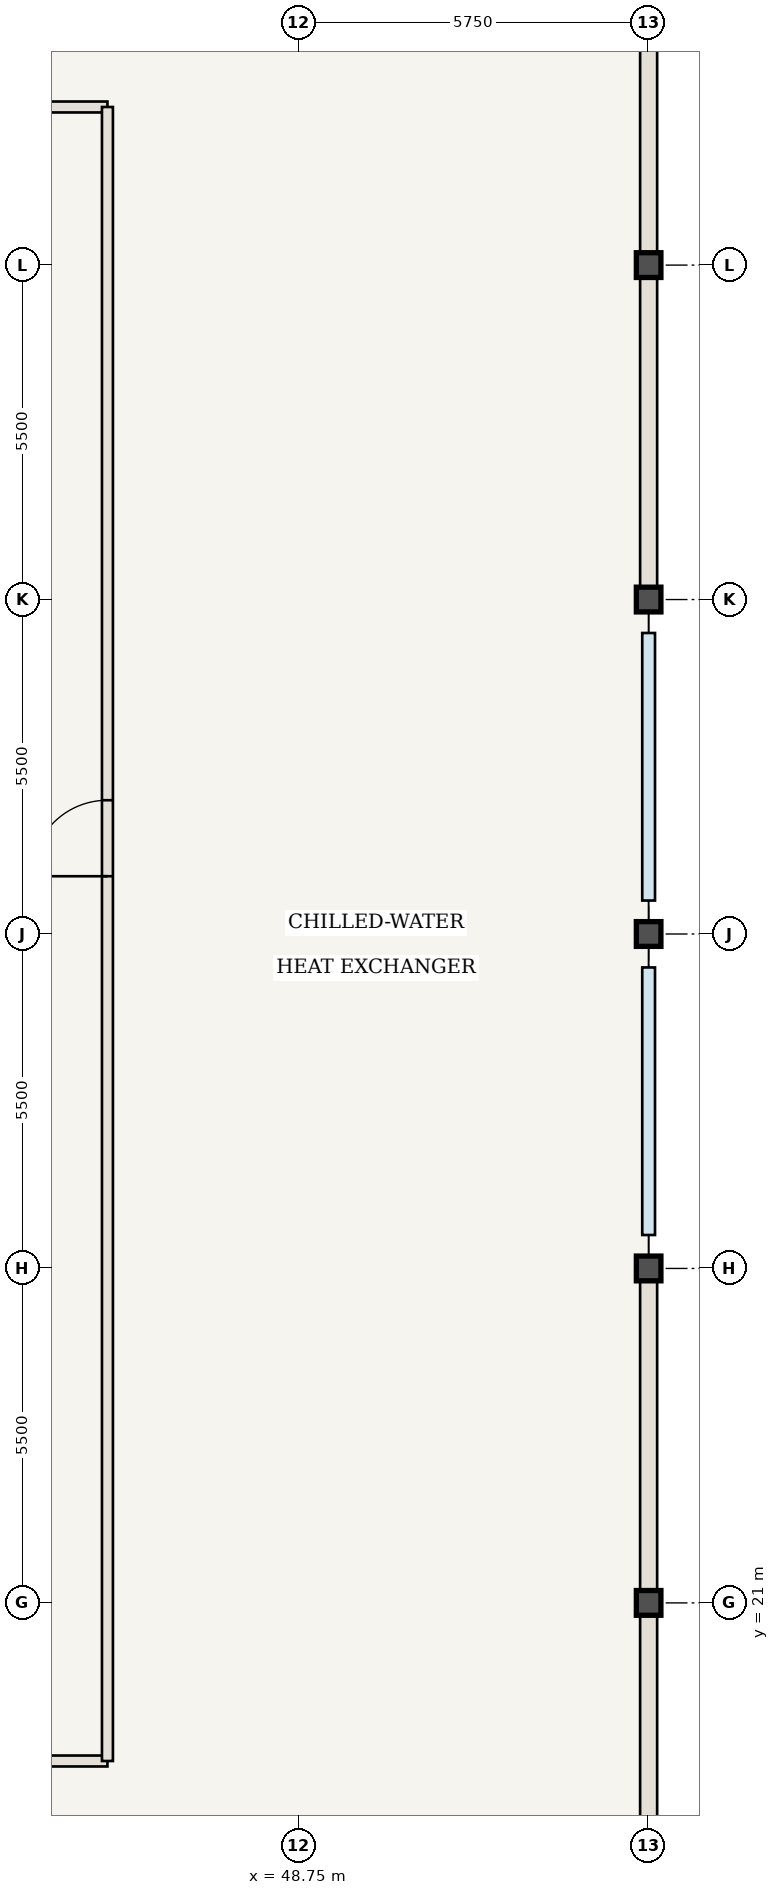
"""IFC4 building model, lengths in metres.
Left out: names, types, materials, properties, quantities, classifications, styles, units other than length and angle.
Written with IfcOpenShell. Run it as: python <this file> out.ifc"""

import sys

from ifc_helpers import new_model, si_unit, direction, frame, frame_2d, origin, origin_2d, place, context, subcontext, project, spatial, rectangle, i_section, extrude, element, fill, save


model = new_model("IFC4")
c1 = context("Model", 3, precision=1e-05, world=origin(), true_north=direction((0.0, 1.0)))
c2 = subcontext(c1, "Body", "Model", "MODEL_VIEW")
j1 = project(units=[si_unit("LENGTHUNIT", "METRE"), si_unit("PLANEANGLEUNIT", "RADIAN")], contexts=[c1])
p1 = place(None, origin())
s1 = spatial("IfcSite", under=j1, at=p1, CompositionType="ELEMENT")
p2 = place(p1, origin())
s2 = spatial("IfcBuilding", under=s1, at=p2, CompositionType="ELEMENT")
p3 = place(p2, frame((0.0, 0.0, 322.35)))
s3 = spatial("IfcBuildingStorey", under=s2, at=p3, CompositionType="ELEMENT", Elevation=322.35)
for number, where, z_axis, x_axis in (
    (1, (54.5, 21.0, 0.0), (0.0, 0.0, 1.0), (1.0, 0.0, 0.0)),
    (2, (54.5, 26.5, 0.0), (0.0, 0.0, 1.0), (1.0, 0.0, 0.0)),
    (3, (54.5, 32.0, 0.0), (0.0, 0.0, 1.0), (1.0, 0.0, 0.0)),
    (4, (54.5, 37.5, 0.0), (0.0, 0.0, 1.0), (1.0, 0.0, 0.0)),
    (5, (54.5, 43.0, 0.0), (0.0, 0.0, 1.0), (1.0, 0.0, 0.0)),
):
    element("IfcColumn", number, at=place(p3, frame(where, z_axis=z_axis, x_axis=x_axis)), inside=s3, PredefinedType="COLUMN", context=c2, shape_type="SweptSolid", body=[
        extrude(i_section(OverallWidth=0.404, OverallDepth=0.407, WebThickness=0.027, FlangeThickness=0.044, at=origin_2d()), origin(), (0.0, 0.0, 1.0), 4.55),
    ])
p4 = place(p3, frame((18.4, 18.4, 0.0), z_axis=(0.0, 0.0, 1.0), x_axis=(1.0, 0.0, 0.0)))
e6 = element("IfcWall", 6, at=p4, inside=s3, PredefinedType="STANDARD", context=c2, shape_type="SweptSolid", body=[
    extrude(rectangle(XDim=27.2, YDim=0.18, at=frame_2d((13.6, 0.0))), origin(), (0.0, 0.0, 1.0), 4.29),
])
p5 = place(p4, frame((4.4, 0.0, 0.0)))
e7 = element("IfcOpeningElement", 7, at=p5, cuts=e6, PredefinedType="OPENING", context=c2, shape_type="SweptSolid", body=[
    extrude(rectangle(XDim=1.25, YDim=2.2, at=frame_2d((0.625, 1.1))), frame((0.0, 0.1, 0.0), z_axis=(0.0, -1.0, 0.0), x_axis=(1.0, 0.0, 0.0)), (0.0, 0.0, 1.0), 0.2),
])
p6 = place(p3, frame((18.4, 45.6, 0.0), z_axis=(0.0, 0.0, 1.0), x_axis=(1.0, 0.0, 0.0)))
e8 = element("IfcWall", 8, at=p6, inside=s3, PredefinedType="STANDARD", context=c2, shape_type="SweptSolid", body=[
    extrude(rectangle(XDim=27.2, YDim=0.18, at=frame_2d((13.6, 0.0))), origin(), (0.0, 0.0, 1.0), 4.29),
])
p7 = place(p6, frame((4.4, 0.0, 0.0)))
e9 = element("IfcOpeningElement", 9, at=p7, cuts=e8, PredefinedType="OPENING", context=c2, shape_type="SweptSolid", body=[
    extrude(rectangle(XDim=1.25, YDim=2.2, at=frame_2d((0.625, 1.1))), frame((0.0, 0.1, 0.0), z_axis=(0.0, -1.0, 0.0), x_axis=(1.0, 0.0, 0.0)), (0.0, 0.0, 1.0), 0.2),
])
p8 = place(p3, frame((45.6, 18.4, 0.0), z_axis=(0.0, 0.0, 1.0), x_axis=(0.0, 1.0, 0.0)))
e10 = element("IfcWall", 10, at=p8, inside=s3, PredefinedType="STANDARD", context=c2, shape_type="SweptSolid", body=[
    extrude(rectangle(XDim=27.2, YDim=0.18, at=frame_2d((13.6, 0.0))), origin(), (0.0, 0.0, 1.0), 4.29),
])
p9 = place(p8, frame((14.55, 0.0, 0.0)))
e11 = element("IfcOpeningElement", 11, at=p9, cuts=e10, PredefinedType="OPENING", context=c2, shape_type="SweptSolid", body=[
    extrude(rectangle(XDim=1.25, YDim=2.2, at=frame_2d((0.625, 1.1))), frame((0.0, 0.1, 0.0), z_axis=(0.0, -1.0, 0.0), x_axis=(1.0, 0.0, 0.0)), (0.0, 0.0, 1.0), 0.2),
])
for number, where, z_axis, x_axis in (
    (12, (54.5, 21.0, 0.0), (0.0, 0.0, 1.0), (0.0, -1.0, 0.0)),
    (13, (54.5, 26.5, 0.0), (0.0, 0.0, 1.0), (0.0, -1.0, 0.0)),
    (14, (54.5, 43.0, 0.0), (0.0, 0.0, 1.0), (0.0, -1.0, 0.0)),
    (15, (54.5, 48.5, 0.0), (0.0, 0.0, 1.0), (0.0, -1.0, 0.0)),
):
    element("IfcWall", number, at=place(p3, frame(where, z_axis=z_axis, x_axis=x_axis)), inside=s3, PredefinedType="USERDEFINED", context=c2, shape_type="SweptSolid", body=[
        extrude(rectangle(XDim=5.5, YDim=0.28, at=frame_2d((2.75, 0.0))), origin(), (0.0, 0.0, 1.0), 3.57),
    ])
p10 = place(p9, origin())
e16 = element("IfcDoor", 16, at=p10, inside=s3, OperationType="SINGLE_SWING_LEFT", PredefinedType="DOOR", context=c2, shape_type="SweptSolid", body=[
    extrude(rectangle(XDim=1.25, YDim=2.2, at=frame_2d((0.625, 1.1))), frame((0.0, 0.025, 0.0), z_axis=(0.0, -1.0, 0.0), x_axis=(1.0, 0.0, 0.0)), (0.0, 0.0, 1.0), 0.05),
])
fill(e11, e16)
save(model, sys.argv[1])
